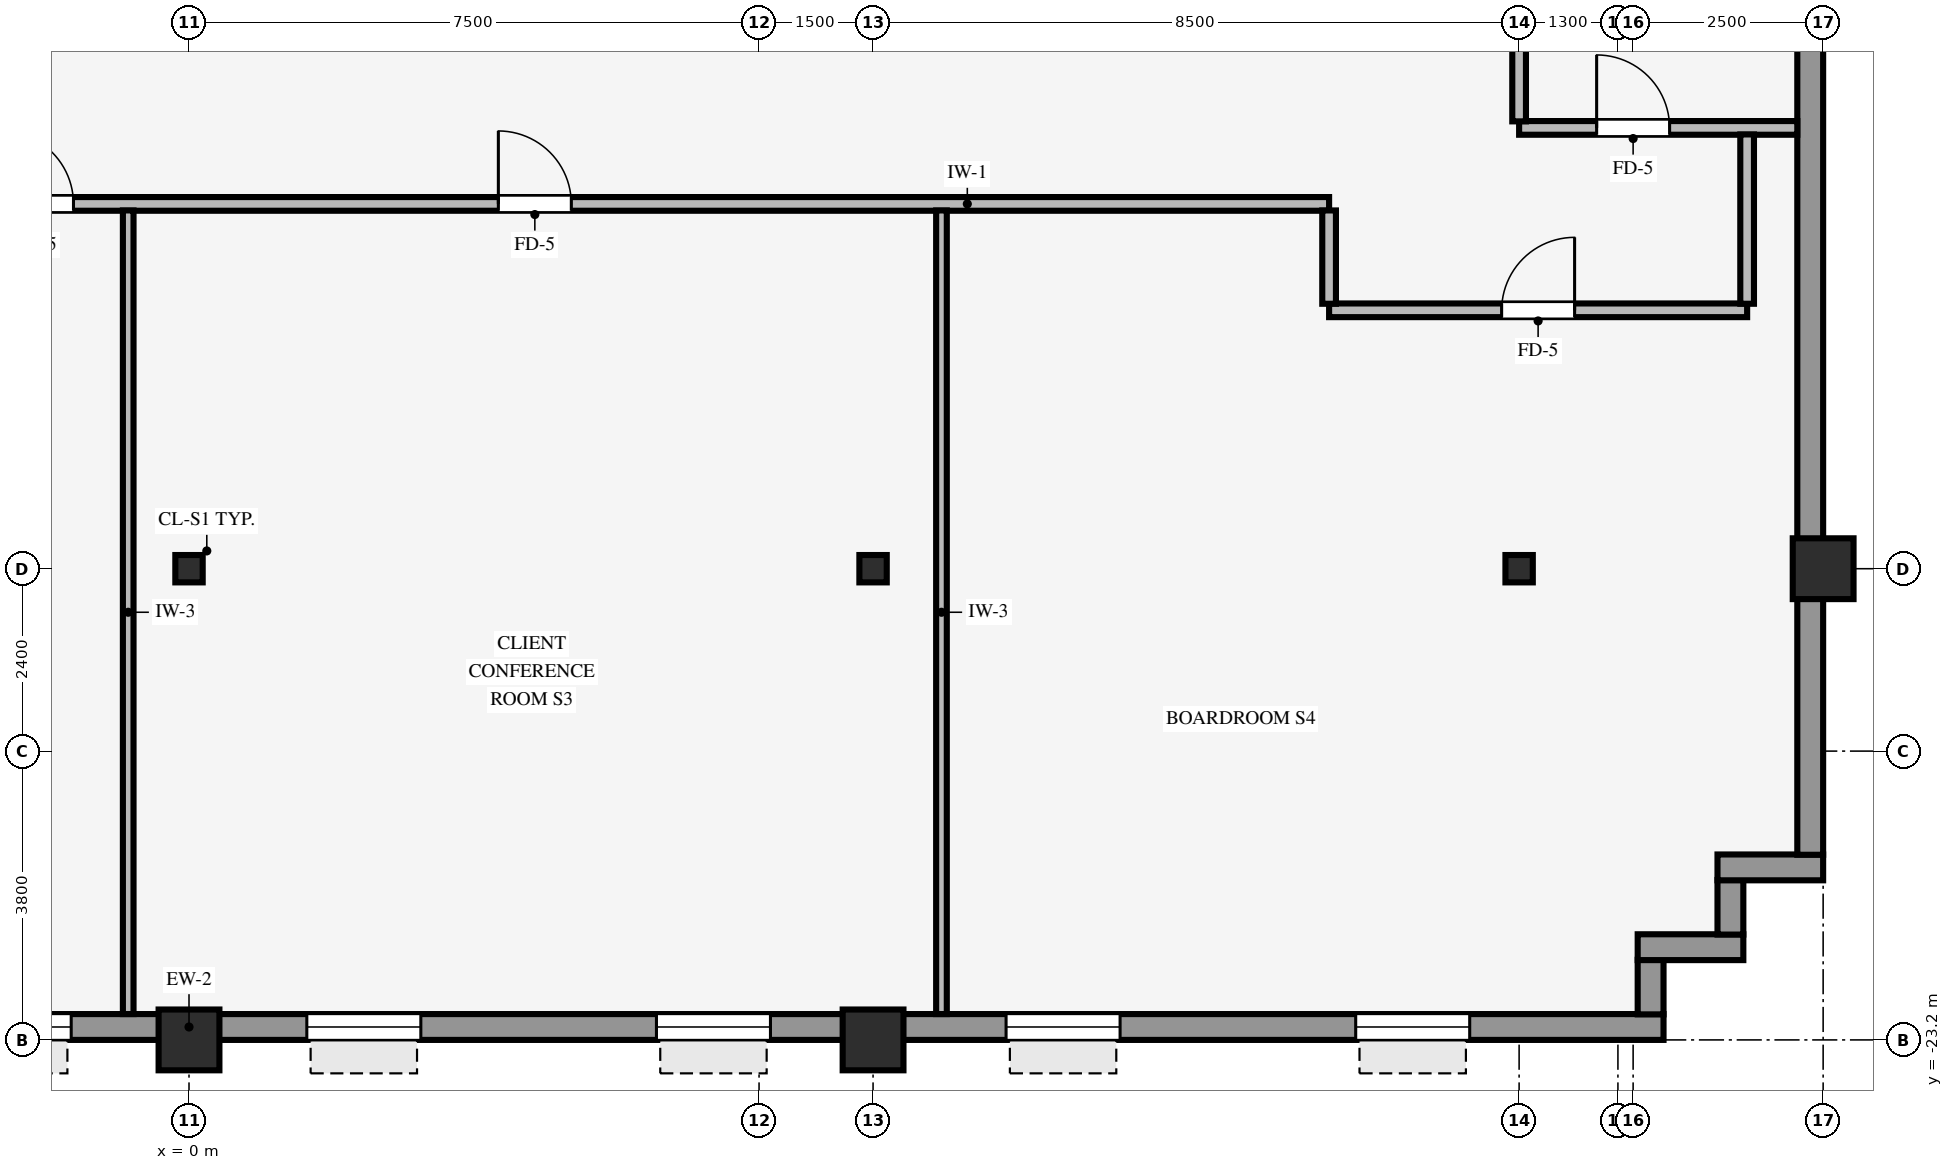
"""IFC4 building model, lengths in metres.
Left out: names, types, materials, properties, quantities, classifications, styles, units other than length and angle.
Written with IfcOpenShell. Run it as: python <this file> out.ifc"""

import sys

from ifc_helpers import new_model, si_unit, direction, frame, frame_2d, origin, origin_2d, place, context, subcontext, project, spatial, rectangle, hollow_rectangle, i_section, extrude, source, transform, mapped, element, fill, save


model = new_model("IFC4")
c1 = context("Model", 3, precision=1e-05, world=origin(), true_north=direction((0.0, 1.0)))
c2 = subcontext(c1, "Body", "Model", "MODEL_VIEW")
j1 = project(units=[si_unit("LENGTHUNIT", "METRE"), si_unit("PLANEANGLEUNIT", "RADIAN")], contexts=[c1])
p1 = place(None, origin())
s1 = spatial("IfcSite", under=j1, at=p1, CompositionType="ELEMENT")
p2 = place(p1, origin())
s2 = spatial("IfcBuilding", under=s1, at=p2, CompositionType="ELEMENT")
p3 = place(p2, frame((0.0, 0.0, 78.7)))
s3 = spatial("IfcBuildingStorey", under=s2, at=p3, CompositionType="ELEMENT", Elevation=78.7)
for number, where, z_axis, x_axis in (
    (1, (21.5, -17.0, 0.0), (0.0, 0.0, 1.0), (1.0, 0.0, 0.0)),
    (2, (0.0, -23.2, 0.0), (0.0, 0.0, 1.0), (1.0, 0.0, 0.0)),
    (3, (9.0, -23.2, 0.0), (0.0, 0.0, 1.0), (1.0, 0.0, 0.0)),
):
    element("IfcColumn", number, at=place(p3, frame(where, z_axis=z_axis, x_axis=x_axis)), inside=s3, PredefinedType="COLUMN", context=c2, shape_type="SweptSolid", body=[
        extrude(hollow_rectangle(XDim=0.8, YDim=0.8, WallThickness=0.055, InnerFilletRadius=0.055, OuterFilletRadius=0.11, at=origin_2d()), origin(), (0.0, 0.0, 1.0), 3.37),
    ])
for number, where, z_axis, x_axis in (
    (4, (0.0, -17.0, 0.0), (0.0, 0.0, 1.0), (1.0, 0.0, 0.0)),
    (5, (9.0, -17.0, 0.0), (0.0, 0.0, 1.0), (1.0, 0.0, 0.0)),
    (6, (17.5, -17.0, 0.0), (0.0, 0.0, 1.0), (1.0, 0.0, 0.0)),
):
    element("IfcColumn", number, at=place(p3, frame(where, z_axis=z_axis, x_axis=x_axis)), inside=s3, PredefinedType="COLUMN", context=c2, shape_type="SweptSolid", body=[
        extrude(i_section(OverallWidth=0.36, OverallDepth=0.36, WebThickness=0.021, FlangeThickness=0.021, FilletRadius=0.018, at=origin_2d()), origin(), (0.0, 0.0, 1.0), 3.37),
    ])
p4 = place(p3, frame((-19.4, -23.03, 0.0), z_axis=(0.0, 0.0, 1.0), x_axis=(1.0, 0.0, 0.0)))
e7 = element("IfcWall", 7, at=p4, inside=s3, PredefinedType="STANDARD", context=c2, shape_type="SweptSolid", body=[
    extrude(rectangle(XDim=38.8, YDim=0.34, at=frame_2d((19.4, 0.0))), origin(), (0.0, 0.0, 1.0), 2.705),
])
p5 = place(p4, frame((2.55, 0.0, 0.8)))
e8 = element("IfcOpeningElement", 8, at=p5, cuts=e7, PredefinedType="OPENING", context=c2, shape_type="SweptSolid", body=[
    extrude(rectangle(XDim=1.5, YDim=1.6, at=frame_2d((0.75, 0.8))), frame((0.0, 0.18, 0.0), z_axis=(0.0, -1.0, 0.0), x_axis=(1.0, 0.0, 0.0)), (0.0, 0.0, 1.0), 0.36),
])
p6 = place(p4, frame((7.15, 0.0, 0.8)))
e9 = element("IfcOpeningElement", 9, at=p6, cuts=e7, PredefinedType="OPENING", context=c2, shape_type="SweptSolid", body=[
    extrude(rectangle(XDim=1.5, YDim=1.6, at=frame_2d((0.75, 0.8))), frame((0.0, 0.18, 0.0), z_axis=(0.0, -1.0, 0.0), x_axis=(1.0, 0.0, 0.0)), (0.0, 0.0, 1.0), 0.36),
])
p7 = place(p4, frame((11.75, 0.0, 0.8)))
e10 = element("IfcOpeningElement", 10, at=p7, cuts=e7, PredefinedType="OPENING", context=c2, shape_type="SweptSolid", body=[
    extrude(rectangle(XDim=1.5, YDim=1.6, at=frame_2d((0.75, 0.8))), frame((0.0, 0.18, 0.0), z_axis=(0.0, -1.0, 0.0), x_axis=(1.0, 0.0, 0.0)), (0.0, 0.0, 1.0), 0.36),
])
p8 = place(p4, frame((16.35, 0.0, 0.8)))
e11 = element("IfcOpeningElement", 11, at=p8, cuts=e7, PredefinedType="OPENING", context=c2, shape_type="SweptSolid", body=[
    extrude(rectangle(XDim=1.5, YDim=1.6, at=frame_2d((0.75, 0.8))), frame((0.0, 0.18, 0.0), z_axis=(0.0, -1.0, 0.0), x_axis=(1.0, 0.0, 0.0)), (0.0, 0.0, 1.0), 0.36),
])
p9 = place(p4, frame((20.95, 0.0, 0.8)))
e12 = element("IfcOpeningElement", 12, at=p9, cuts=e7, PredefinedType="OPENING", context=c2, shape_type="SweptSolid", body=[
    extrude(rectangle(XDim=1.5, YDim=1.6, at=frame_2d((0.75, 0.8))), frame((0.0, 0.18, 0.0), z_axis=(0.0, -1.0, 0.0), x_axis=(1.0, 0.0, 0.0)), (0.0, 0.0, 1.0), 0.36),
])
p10 = place(p4, frame((25.55, 0.0, 0.8)))
e13 = element("IfcOpeningElement", 13, at=p10, cuts=e7, PredefinedType="OPENING", context=c2, shape_type="SweptSolid", body=[
    extrude(rectangle(XDim=1.5, YDim=1.6, at=frame_2d((0.75, 0.8))), frame((0.0, 0.18, 0.0), z_axis=(0.0, -1.0, 0.0), x_axis=(1.0, 0.0, 0.0)), (0.0, 0.0, 1.0), 0.36),
])
p11 = place(p4, frame((30.15, 0.0, 0.8)))
e14 = element("IfcOpeningElement", 14, at=p11, cuts=e7, PredefinedType="OPENING", context=c2, shape_type="SweptSolid", body=[
    extrude(rectangle(XDim=1.5, YDim=1.6, at=frame_2d((0.75, 0.8))), frame((0.0, 0.18, 0.0), z_axis=(0.0, -1.0, 0.0), x_axis=(1.0, 0.0, 0.0)), (0.0, 0.0, 1.0), 0.36),
])
p12 = place(p4, frame((34.75, 0.0, 0.8)))
e15 = element("IfcOpeningElement", 15, at=p12, cuts=e7, PredefinedType="OPENING", context=c2, shape_type="SweptSolid", body=[
    extrude(rectangle(XDim=1.5, YDim=1.6, at=frame_2d((0.75, 0.8))), frame((0.0, 0.18, 0.0), z_axis=(0.0, -1.0, 0.0), x_axis=(1.0, 0.0, 0.0)), (0.0, 0.0, 1.0), 0.36),
])
p13 = place(p3, frame((19.23, -22.864, 0.0), z_axis=(0.0, 0.0, 1.0), x_axis=(0.0, 1.0, 0.0)))
e16 = element("IfcWall", 16, at=p13, inside=s3, PredefinedType="STANDARD", context=c2, shape_type="SweptSolid", body=[
    extrude(rectangle(XDim=0.718, YDim=0.34, at=frame_2d((0.359, 0.0))), origin(), (0.0, 0.0, 1.0), 3.36),
])
p14 = place(p3, frame((19.06, -21.98, 0.0), z_axis=(0.0, 0.0, 1.0), x_axis=(1.0, 0.0, 0.0)))
e17 = element("IfcWall", 17, at=p14, inside=s3, PredefinedType="STANDARD", context=c2, shape_type="SweptSolid", body=[
    extrude(rectangle(XDim=1.39, YDim=0.34, at=frame_2d((0.695, 0.0))), origin(), (0.0, 0.0, 1.0), 3.36),
])
p15 = place(p3, frame((20.28, -21.814, 0.0), z_axis=(0.0, 0.0, 1.0), x_axis=(0.0, 1.0, 0.0)))
e18 = element("IfcWall", 18, at=p15, inside=s3, PredefinedType="STANDARD", context=c2, shape_type="SweptSolid", body=[
    extrude(rectangle(XDim=0.718, YDim=0.34, at=frame_2d((0.359, 0.0))), origin(), (0.0, 0.0, 1.0), 3.36),
])
p16 = place(p3, frame((20.11, -20.93, 0.0), z_axis=(0.0, 0.0, 1.0), x_axis=(1.0, 0.0, 0.0)))
e19 = element("IfcWall", 19, at=p16, inside=s3, PredefinedType="STANDARD", context=c2, shape_type="SweptSolid", body=[
    extrude(rectangle(XDim=1.39, YDim=0.34, at=frame_2d((0.695, 0.0))), origin(), (0.0, 0.0, 1.0), 3.36),
])
p17 = place(p3, frame((21.33, -20.764, 0.0), z_axis=(0.0, 0.0, 1.0), x_axis=(0.0, 1.0, 0.0)))
e20 = element("IfcWall", 20, at=p17, inside=s3, PredefinedType="STANDARD", context=c2, shape_type="SweptSolid", body=[
    extrude(rectangle(XDim=41.528, YDim=0.34, at=frame_2d((20.764, 0.0))), origin(), (0.0, 0.0, 1.0), 2.705),
])
p18 = place(p17, frame((12.202, 0.0, 0.8)))
e21 = element("IfcOpeningElement", 21, at=p18, cuts=e20, PredefinedType="OPENING", context=c2, shape_type="SweptSolid", body=[
    extrude(rectangle(XDim=2.3, YDim=1.62, at=frame_2d((1.15, 0.81))), frame((0.0, 0.18, 0.0), z_axis=(0.0, -1.0, 0.0), x_axis=(1.0, 0.0, 0.0)), (0.0, 0.0, 1.0), 0.36),
])
p19 = place(p17, frame((15.793, 0.0, 0.8)))
e22 = element("IfcOpeningElement", 22, at=p19, cuts=e20, PredefinedType="OPENING", context=c2, shape_type="SweptSolid", body=[
    extrude(rectangle(XDim=2.3, YDim=1.62, at=frame_2d((1.15, 0.81))), frame((0.0, 0.18, 0.0), z_axis=(0.0, -1.0, 0.0), x_axis=(1.0, 0.0, 0.0)), (0.0, 0.0, 1.0), 0.36),
])
p20 = place(p17, frame((22.084, 0.0, 0.8)))
e23 = element("IfcOpeningElement", 23, at=p20, cuts=e20, PredefinedType="OPENING", context=c2, shape_type="SweptSolid", body=[
    extrude(rectangle(XDim=2.3, YDim=1.62, at=frame_2d((1.15, 0.81))), frame((0.0, 0.18, 0.0), z_axis=(0.0, -1.0, 0.0), x_axis=(1.0, 0.0, 0.0)), (0.0, 0.0, 1.0), 0.36),
])
p21 = place(p17, frame((27.025, 0.0, 0.8)))
e24 = element("IfcOpeningElement", 24, at=p21, cuts=e20, PredefinedType="OPENING", context=c2, shape_type="SweptSolid", body=[
    extrude(rectangle(XDim=2.3, YDim=1.62, at=frame_2d((1.15, 0.81))), frame((0.0, 0.18, 0.0), z_axis=(0.0, -1.0, 0.0), x_axis=(1.0, 0.0, 0.0)), (0.0, 0.0, 1.0), 0.36),
])
p22 = place(p3, frame((15.0, -13.6, 0.0), z_axis=(0.0, 0.0, 1.0), x_axis=(1.0, 0.0, 0.0)))
e25 = element("IfcWall", 25, at=p22, inside=s3, PredefinedType="PARTITIONING", context=c2, shape_type="SweptSolid", body=[
    extrude(rectangle(XDim=5.5, YDim=0.18, at=frame_2d((2.75, 0.0))), origin(), (0.0, 0.0, 1.0), 2.942),
])
p23 = place(p22, frame((2.27, 0.0, 0.0)))
e26 = element("IfcOpeningElement", 26, at=p23, cuts=e25, PredefinedType="OPENING", context=c2, shape_type="SweptSolid", body=[
    extrude(rectangle(XDim=0.96, YDim=2.1, at=frame_2d((0.48, 1.05))), frame((0.0, 0.1, 0.0), z_axis=(0.0, -1.0, 0.0), x_axis=(1.0, 0.0, 0.0)), (0.0, 0.0, 1.0), 0.2),
])
p24 = place(p3, frame((-15.0, -12.2, 0.0), z_axis=(0.0, 0.0, 1.0), x_axis=(1.0, 0.0, 0.0)))
e27 = element("IfcWall", 27, at=p24, inside=s3, PredefinedType="PARTITIONING", context=c2, shape_type="SweptSolid", body=[
    extrude(rectangle(XDim=30.0, YDim=0.18, at=frame_2d((15.0, 0.0))), origin(), (0.0, 0.0, 1.0), 3.36),
])
p25 = place(p24, frame((19.07, 0.0, 0.0)))
e28 = element("IfcOpeningElement", 28, at=p25, cuts=e27, PredefinedType="OPENING", context=c2, shape_type="SweptSolid", body=[
    extrude(rectangle(XDim=0.96, YDim=2.1, at=frame_2d((0.48, 1.05))), frame((0.0, 0.1, 0.0), z_axis=(0.0, -1.0, 0.0), x_axis=(1.0, 0.0, 0.0)), (0.0, 0.0, 1.0), 0.2),
])
p26 = place(p24, frame((5.45, 0.0, 0.0)))
e29 = element("IfcOpeningElement", 29, at=p26, cuts=e27, PredefinedType="OPENING", context=c2, shape_type="SweptSolid", body=[
    extrude(rectangle(XDim=0.9, YDim=2.1, at=frame_2d((0.45, 1.05))), frame((0.0, 0.1, 0.0), z_axis=(0.0, -1.0, 0.0), x_axis=(1.0, 0.0, 0.0)), (0.0, 0.0, 1.0), 0.2),
])
p27 = place(p24, frame((2.85, 0.0, 0.0)))
e30 = element("IfcOpeningElement", 30, at=p27, cuts=e27, PredefinedType="OPENING", context=c2, shape_type="SweptSolid", body=[
    extrude(rectangle(XDim=0.9, YDim=2.1, at=frame_2d((0.45, 1.05))), frame((0.0, 0.1, 0.0), z_axis=(0.0, -1.0, 0.0), x_axis=(1.0, 0.0, 0.0)), (0.0, 0.0, 1.0), 0.2),
])
p28 = place(p24, frame((12.52, 0.0, 0.0)))
e31 = element("IfcOpeningElement", 31, at=p28, cuts=e27, PredefinedType="OPENING", context=c2, shape_type="SweptSolid", body=[
    extrude(rectangle(XDim=0.96, YDim=2.1, at=frame_2d((0.48, 1.05))), frame((0.0, 0.1, 0.0), z_axis=(0.0, -1.0, 0.0), x_axis=(1.0, 0.0, 0.0)), (0.0, 0.0, 1.0), 0.2),
])
p29 = place(p24, frame((7.95, 0.0, 0.0)))
e32 = element("IfcOpeningElement", 32, at=p29, cuts=e27, PredefinedType="OPENING", context=c2, shape_type="SweptSolid", body=[
    extrude(rectangle(XDim=0.9, YDim=2.1, at=frame_2d((0.45, 1.05))), frame((0.0, 0.1, 0.0), z_axis=(0.0, -1.0, 0.0), x_axis=(1.0, 0.0, 0.0)), (0.0, 0.0, 1.0), 0.2),
])
p30 = place(p3, frame((17.5, -11.2, 0.0), z_axis=(0.0, 0.0, 1.0), x_axis=(1.0, 0.0, 0.0)))
e33 = element("IfcWall", 33, at=p30, inside=s3, PredefinedType="PARTITIONING", context=c2, shape_type="SweptSolid", body=[
    extrude(rectangle(XDim=3.66, YDim=0.18, at=frame_2d((1.83, 0.0))), origin(), (0.0, 0.0, 1.0), 3.36),
])
p31 = place(p30, frame((1.02, 0.0, 0.0)))
e34 = element("IfcOpeningElement", 34, at=p31, cuts=e33, PredefinedType="OPENING", context=c2, shape_type="SweptSolid", body=[
    extrude(rectangle(XDim=0.96, YDim=2.1, at=frame_2d((0.48, 1.05))), frame((0.0, 0.1, 0.0), z_axis=(0.0, -1.0, 0.0), x_axis=(1.0, 0.0, 0.0)), (0.0, 0.0, 1.0), 0.2),
])
for number, where, z_axis, x_axis in (
    (35, (-0.8, -22.86, 0.0), (0.0, 0.0, 1.0), (0.0, 1.0, 0.0)),
    (36, (9.9, -22.86, 0.0), (0.0, 0.0, 1.0), (0.0, 1.0, 0.0)),
):
    element("IfcWall", number, at=place(p3, frame(where, z_axis=z_axis, x_axis=x_axis)), inside=s3, PredefinedType="PARTITIONING", context=c2, shape_type="SweptSolid", body=[
        extrude(rectangle(XDim=10.574, YDim=0.14, at=frame_2d((5.287, 0.0))), origin(), (0.0, 0.0, 1.0), 3.36),
    ])
p32 = place(p3, frame((15.0, -13.514, 0.0), z_axis=(0.0, 0.0, 1.0), x_axis=(0.0, 1.0, 0.0)))
e37 = element("IfcWall", 37, at=p32, inside=s3, PredefinedType="PARTITIONING", context=c2, shape_type="SweptSolid", body=[
    extrude(rectangle(XDim=1.228, YDim=0.18, at=frame_2d((0.614, 0.0))), origin(), (0.0, 0.0, 1.0), 3.36),
])
p33 = place(p3, frame((17.5, -11.114, 0.0), z_axis=(0.0, 0.0, 1.0), x_axis=(0.0, 1.0, 0.0)))
e38 = element("IfcWall", 38, at=p33, inside=s3, PredefinedType="PARTITIONING", context=c2, shape_type="SweptSolid", body=[
    extrude(rectangle(XDim=0.968, YDim=0.18, at=frame_2d((0.484, 0.0))), origin(), (0.0, 0.0, 1.0), 2.738),
])
p34 = place(p3, frame((20.5, -13.514, 0.0), z_axis=(0.0, 0.0, 1.0), x_axis=(0.0, 1.0, 0.0)))
e39 = element("IfcWall", 39, at=p34, inside=s3, PredefinedType="PARTITIONING", context=c2, shape_type="SweptSolid", body=[
    extrude(rectangle(XDim=2.228, YDim=0.18, at=frame_2d((1.114, 0.0))), origin(), (0.0, 0.0, 1.0), 3.36),
])
m1 = source(origin(), c2, "Body", "SweptSolid", [
    extrude(rectangle(XDim=1.5, YDim=1.6, at=frame_2d((0.75, 0.8))), frame((0.0, 0.03, 0.0), z_axis=(0.0, -1.0, 0.0), x_axis=(1.0, 0.0, 0.0)), (0.0, 0.0, 1.0), 0.06),
])
p35 = place(p8, origin())
e40 = element("IfcWindow", 40, at=p35, inside=s3, PartitioningType="SINGLE_PANEL", PredefinedType="WINDOW", context=c2, shape_type="MappedRepresentation", body=[
    mapped(m1, transform((0.0, 0.0, 0.0), scale=1.0)),
])
fill(e11, e40)
p36 = place(p9, origin())
e41 = element("IfcWindow", 41, at=p36, inside=s3, PartitioningType="SINGLE_PANEL", PredefinedType="WINDOW", context=c2, shape_type="MappedRepresentation", body=[
    mapped(m1, transform((0.0, 0.0, 0.0), scale=1.0)),
])
fill(e12, e41)
p37 = place(p10, origin())
e42 = element("IfcWindow", 42, at=p37, inside=s3, PartitioningType="SINGLE_PANEL", PredefinedType="WINDOW", context=c2, shape_type="MappedRepresentation", body=[
    mapped(m1, transform((0.0, 0.0, 0.0), scale=1.0)),
])
fill(e13, e42)
p38 = place(p11, origin())
e43 = element("IfcWindow", 43, at=p38, inside=s3, PartitioningType="SINGLE_PANEL", PredefinedType="WINDOW", context=c2, shape_type="MappedRepresentation", body=[
    mapped(m1, transform((0.0, 0.0, 0.0), scale=1.0)),
])
fill(e14, e43)
p39 = place(p12, origin())
e44 = element("IfcWindow", 44, at=p39, inside=s3, PartitioningType="SINGLE_PANEL", PredefinedType="WINDOW", context=c2, shape_type="MappedRepresentation", body=[
    mapped(m1, transform((0.0, 0.0, 0.0), scale=1.0)),
])
fill(e15, e44)
m2 = source(origin(), c2, "Body", "SweptSolid", [
    extrude(rectangle(XDim=0.96, YDim=2.1, at=frame_2d((0.48, 1.05))), frame((0.0, 0.025, 0.0), z_axis=(0.0, -1.0, 0.0), x_axis=(1.0, 0.0, 0.0)), (0.0, 0.0, 1.0), 0.05),
])
p40 = place(p25, origin())
e45 = element("IfcDoor", 45, at=p40, inside=s3, OperationType="SINGLE_SWING_LEFT", PredefinedType="DOOR", context=c2, shape_type="MappedRepresentation", body=[
    mapped(m2, transform((0.0, 0.0, 0.0), scale=1.0)),
])
fill(e28, e45)
p41 = place(p23, origin())
e46 = element("IfcDoor", 46, at=p41, inside=s3, OperationType="SINGLE_SWING_RIGHT", PredefinedType="DOOR", context=c2, shape_type="MappedRepresentation", body=[
    mapped(m2, transform((0.0, 0.0, 0.0), scale=1.0)),
])
fill(e26, e46)
p42 = place(p31, origin())
e47 = element("IfcDoor", 47, at=p42, inside=s3, OperationType="SINGLE_SWING_LEFT", PredefinedType="DOOR", context=c2, shape_type="MappedRepresentation", body=[
    mapped(m2, transform((0.0, 0.0, 0.0), scale=1.0)),
])
fill(e34, e47)
p43 = place(p28, origin())
e48 = element("IfcDoor", 48, at=p43, inside=s3, OperationType="SINGLE_SWING_LEFT", PredefinedType="DOOR", context=c2, shape_type="MappedRepresentation", body=[
    mapped(m2, transform((0.0, 0.0, 0.0), scale=1.0)),
])
fill(e31, e48)
save(model, sys.argv[1])
